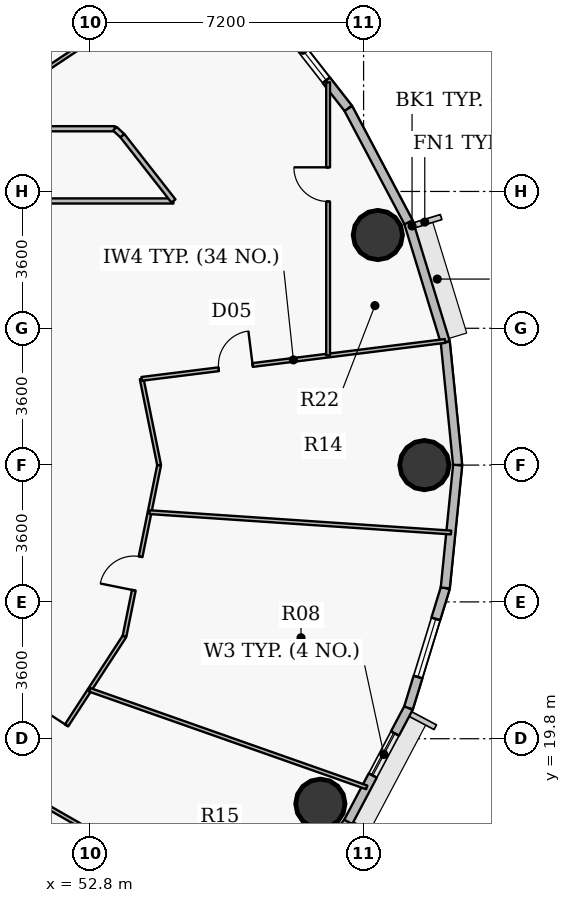
"""IFC4 building model, lengths in metres.
Left out: names, types, materials, properties, quantities, classifications, styles, units other than length and angle.
Written with IfcOpenShell. Run it as: python <this file> out.ifc"""

import sys

from ifc_helpers import new_model, si_unit, direction, frame, frame_2d, origin, origin_2d, place, context, subcontext, project, spatial, rectangle, hollow_circle, extrude, source, transform, mapped, element, fill, save


model = new_model("IFC4")
c1 = context("Model", 3, precision=1e-05, world=origin(), true_north=direction((0.0, 1.0)))
c2 = subcontext(c1, "Body", "Model", "MODEL_VIEW")
j1 = project(units=[si_unit("LENGTHUNIT", "METRE"), si_unit("PLANEANGLEUNIT", "RADIAN")], contexts=[c1])
p1 = place(None, origin())
s1 = spatial("IfcSite", under=j1, at=p1, CompositionType="ELEMENT")
p2 = place(p1, origin())
s2 = spatial("IfcBuilding", under=s1, at=p2, CompositionType="ELEMENT")
p3 = place(p2, frame((0.0, 0.0, 201.15)))
s3 = spatial("IfcBuildingStorey", under=s2, at=p3, CompositionType="ELEMENT", Elevation=201.15)
for number, where, z_axis, x_axis in (
    (1, (61.6, 27.0, 0.0), (0.0, 0.0, 1.0), (1.0, 0.0, 0.0)),
    (2, (60.375, 33.053, 0.0), (0.0, 0.0, 1.0), (1.0, 0.0, 0.0)),
    (3, (58.863, 18.089, 0.0), (0.0, 0.0, 1.0), (1.0, 0.0, 0.0)),
):
    element("IfcColumn", number, at=place(p3, frame(where, z_axis=z_axis, x_axis=x_axis)), inside=s3, PredefinedType="COLUMN", context=c2, shape_type="SweptSolid", body=[
        extrude(hollow_circle(Radius=0.65, WallThickness=0.04, at=origin_2d()), origin(), (0.0, 0.0, 1.0), 3.75),
    ])
p4 = place(p3, frame((62.15, 30.234, 0.0), z_axis=(0.0, 0.0, 1.0), x_axis=(0.100061534614, -0.994981250723, 0.0)))
e4 = element("IfcWall", 4, at=p4, inside=s3, PredefinedType="SOLIDWALL", context=c2, shape_type="SweptSolid", body=[
    extrude(rectangle(XDim=3.25, YDim=0.24, at=frame_2d((1.625, 0.0))), origin(), (0.0, 0.0, 1.0), 3.45),
])
p5 = place(p3, frame((61.183, 33.389, 0.0), z_axis=(0.0, 0.0, 1.0), x_axis=(0.293097995113, -0.956082405058, 0.0)))
e5 = element("IfcWall", 5, at=p5, inside=s3, PredefinedType="SOLIDWALL", context=c2, shape_type="SweptSolid", body=[
    extrude(rectangle(XDim=3.3, YDim=0.24, at=frame_2d((1.65, 0.0))), origin(), (0.0, 0.0, 1.0), 3.45),
])
p6 = place(p3, frame((59.596, 36.388, 0.0), z_axis=(0.0, 0.0, 1.0), x_axis=(0.467586874938, -0.88394712194, 0.0)))
e6 = element("IfcWall", 6, at=p6, inside=s3, PredefinedType="SOLIDWALL", context=c2, shape_type="SweptSolid", body=[
    extrude(rectangle(XDim=3.393, YDim=0.24, at=frame_2d((1.697, 0.0))), origin(), (0.0, 0.0, 1.0), 3.45),
])
p7 = place(p3, frame((57.428, 39.158, 0.0), z_axis=(0.0, 0.0, 1.0), x_axis=(0.616287674549, -0.787521112224, 0.0)))
e7 = element("IfcWall", 7, at=p7, inside=s3, PredefinedType="SOLIDWALL", context=c2, shape_type="SweptSolid", body=[
    extrude(rectangle(XDim=3.517, YDim=0.24, at=frame_2d((1.759, 0.0))), origin(), (0.0, 0.0, 1.0), 3.45),
])
p8 = place(p7, frame((0.579, 0.0, 0.9)))
e8 = element("IfcOpeningElement", 8, at=p8, cuts=e7, PredefinedType="OPENING", context=c2, shape_type="SweptSolid", body=[
    extrude(rectangle(XDim=2.0, YDim=1.75, at=origin_2d()), frame((1.0, 0.13, 0.875), z_axis=(0.0, -1.0, 0.0), x_axis=(1.0, 0.0, 0.0)), (0.0, 0.0, 1.0), 0.26),
])
p9 = place(p3, frame((59.596, 17.612, 0.0), z_axis=(0.0, 0.0, 1.0), x_axis=(-0.616287674549, -0.787521112224, 0.0)))
e9 = element("IfcWall", 9, at=p9, inside=s3, PredefinedType="SOLIDWALL", context=c2, shape_type="SweptSolid", body=[
    extrude(rectangle(XDim=3.517, YDim=0.24, at=frame_2d((1.759, 0.0))), origin(), (0.0, 0.0, 1.0), 3.45),
])
p10 = place(p3, frame((61.183, 20.611, 0.0), z_axis=(0.0, 0.0, 1.0), x_axis=(-0.467586874938, -0.88394712194, 0.0)))
e10 = element("IfcWall", 10, at=p10, inside=s3, PredefinedType="SOLIDWALL", context=c2, shape_type="SweptSolid", body=[
    extrude(rectangle(XDim=3.393, YDim=0.24, at=frame_2d((1.697, 0.0))), origin(), (0.0, 0.0, 1.0), 3.45),
])
p11 = place(p10, frame((0.762, 0.0, 0.9)))
e11 = element("IfcOpeningElement", 11, at=p11, cuts=e10, PredefinedType="OPENING", context=c2, shape_type="SweptSolid", body=[
    extrude(rectangle(XDim=1.25, YDim=1.65, at=origin_2d()), frame((0.625, 0.13, 0.825), z_axis=(0.0, -1.0, 0.0), x_axis=(1.0, 0.0, 0.0)), (0.0, 0.0, 1.0), 0.26),
])
p12 = place(p3, frame((62.15, 23.766, 0.0), z_axis=(0.0, 0.0, 1.0), x_axis=(-0.293097995113, -0.956082405058, 0.0)))
e12 = element("IfcWall", 12, at=p12, inside=s3, PredefinedType="SOLIDWALL", context=c2, shape_type="SweptSolid", body=[
    extrude(rectangle(XDim=3.3, YDim=0.24, at=frame_2d((1.65, 0.0))), origin(), (0.0, 0.0, 1.0), 3.45),
])
p13 = place(p12, frame((0.85, 0.0, 0.9)))
e13 = element("IfcOpeningElement", 13, at=p13, cuts=e12, PredefinedType="OPENING", context=c2, shape_type="SweptSolid", body=[
    extrude(rectangle(XDim=1.6, YDim=1.75, at=origin_2d()), frame((0.8, 0.13, 0.875), z_axis=(0.0, -1.0, 0.0), x_axis=(1.0, 0.0, 0.0)), (0.0, 0.0, 1.0), 0.26),
])
p14 = place(p3, frame((62.475, 27.0, 0.0), z_axis=(0.0, 0.0, 1.0), x_axis=(-0.100061534614, -0.994981250723, 0.0)))
e14 = element("IfcWall", 14, at=p14, inside=s3, PredefinedType="SOLIDWALL", context=c2, shape_type="SweptSolid", body=[
    extrude(rectangle(XDim=3.25, YDim=0.24, at=frame_2d((1.625, 0.0))), origin(), (0.0, 0.0, 1.0), 3.45),
])
p15 = place(p3, frame((38.541, 35.85, 0.0), z_axis=(0.0, 0.0, 1.0), x_axis=(1.0, 0.0, 0.0)))
e15 = element("IfcWall", 15, at=p15, inside=s3, PredefinedType="PARTITIONING", context=c2, shape_type="SweptSolid", body=[
    extrude(rectangle(XDim=14.913, YDim=0.135, at=frame_2d((7.456, 0.0))), origin(), (0.0, 0.0, 1.0), 2.885),
])
p16 = place(p15, frame((9.46, 0.0, 0.0)))
e16 = element("IfcOpeningElement", 16, at=p16, cuts=e15, PredefinedType="OPENING", context=c2, shape_type="SweptSolid", body=[
    extrude(rectangle(XDim=1.0, YDim=2.15, at=origin_2d()), frame((0.5, 0.078, 1.075), z_axis=(0.0, -1.0, 0.0), x_axis=(1.0, 0.0, 0.0)), (0.0, 0.0, 1.0), 0.155),
])
p17 = place(p3, frame((44.571, 18.15, 0.0), z_axis=(0.0, 0.0, 1.0), x_axis=(0.695670435579, -0.718361082647, 0.0)))
e17 = element("IfcWall", 17, at=p17, inside=s3, PredefinedType="PARTITIONING", context=c2, shape_type="SweptSolid", body=[
    extrude(rectangle(XDim=10.63, YDim=0.135, at=frame_2d((5.315, 0.0))), origin(), (0.0, 0.0, 1.0), 2.885),
])
p18 = place(p3, frame((45.8, 33.95, 0.0), z_axis=(0.0, 0.0, 1.0), x_axis=(1.0, 0.0, 0.0)))
e18 = element("IfcWall", 18, at=p18, inside=s3, PredefinedType="PARTITIONING", context=c2, shape_type="SweptSolid", body=[
    extrude(rectangle(XDim=9.197, YDim=0.135, at=frame_2d((4.599, 0.0))), origin(), (0.0, 0.0, 1.0), 3.45),
])
p19 = place(p3, frame((50.06, 36.356, 0.0), z_axis=(0.0, 0.0, 1.0), x_axis=(0.832520763353, 0.553993843455, 0.0)))
e19 = element("IfcWall", 19, at=p19, inside=s3, PredefinedType="PARTITIONING", context=c2, shape_type="SweptSolid", body=[
    extrude(rectangle(XDim=7.26, YDim=0.1, at=frame_2d((3.63, 0.0))), origin(), (0.0, 0.0, 1.0), 2.885),
])
p20 = place(p19, frame((3.18, 0.0, 0.0)))
e20 = element("IfcOpeningElement", 20, at=p20, cuts=e19, PredefinedType="OPENING", context=c2, shape_type="SweptSolid", body=[
    extrude(rectangle(XDim=0.9, YDim=2.1, at=origin_2d()), frame((0.45, 0.06, 1.05), z_axis=(0.0, -1.0, 0.0), x_axis=(1.0, 0.0, 0.0)), (0.0, 0.0, 1.0), 0.12),
])
p21 = place(p3, frame((51.017, 18.393, 0.0), z_axis=(0.0, 0.0, 1.0), x_axis=(0.867591997953, -0.497276708773, 0.0)))
e21 = element("IfcWall", 21, at=p21, inside=s3, PredefinedType="PARTITIONING", context=c2, shape_type="SweptSolid", body=[
    extrude(rectangle(XDim=7.3, YDim=0.1, at=frame_2d((3.65, 0.0))), origin(), (0.0, 0.0, 1.0), 2.885),
])
p22 = place(p3, frame((51.064, 18.429, 0.0), z_axis=(0.0, 0.0, 1.0), x_axis=(0.545382906853, 0.838187022634, 0.0)))
e22 = element("IfcWall", 22, at=p22, inside=s3, PredefinedType="PARTITIONING", context=c2, shape_type="SweptSolid", body=[
    extrude(rectangle(XDim=4.849, YDim=0.1, at=frame_2d((2.425, 0.0))), origin(), (0.0, 0.0, 1.0), 2.885),
])
p23 = place(p22, frame((1.155, 0.0, 0.0)))
e23 = element("IfcOpeningElement", 23, at=p23, cuts=e22, PredefinedType="OPENING", context=c2, shape_type="SweptSolid", body=[
    extrude(rectangle(XDim=0.9, YDim=2.1, at=origin_2d()), frame((0.45, 0.06, 1.05), z_axis=(0.0, -1.0, 0.0), x_axis=(1.0, 0.0, 0.0)), (0.0, 0.0, 1.0), 0.12),
])
p24 = place(p3, frame((52.793, 21.087, 0.0), z_axis=(0.0, 0.0, 1.0), x_axis=(0.94322572083, -0.33215243423, 0.0)))
e24 = element("IfcWall", 24, at=p24, inside=s3, PredefinedType="PARTITIONING", context=c2, shape_type="SweptSolid", body=[
    extrude(rectangle(XDim=7.728, YDim=0.1, at=frame_2d((3.864, 0.0))), origin(), (0.0, 0.0, 1.0), 2.885),
])
p25 = place(p3, frame((53.454, 35.85, 0.0), z_axis=(0.0, 0.0, 1.0), x_axis=(0.736667385572, -0.676255249913, 0.0)))
e25 = element("IfcWall", 25, at=p25, inside=s3, PredefinedType="PARTITIONING", context=c2, shape_type="SweptSolid", body=[
    extrude(rectangle(XDim=0.271, YDim=0.135, at=frame_2d((0.135, 0.0))), origin(), (0.0, 0.0, 1.0), 3.45),
])
p26 = place(p3, frame((53.653, 35.667, 0.0), z_axis=(0.0, 0.0, 1.0), x_axis=(0.616302223209, -0.787509726713, 0.0)))
e26 = element("IfcWall", 26, at=p26, inside=s3, PredefinedType="PARTITIONING", context=c2, shape_type="SweptSolid", body=[
    extrude(rectangle(XDim=2.18, YDim=0.135, at=frame_2d((1.09, 0.0))), origin(), (0.0, 0.0, 1.0), 3.45),
])
p27 = place(p3, frame((53.709, 22.494, 0.0), z_axis=(0.0, 0.0, 1.0), x_axis=(0.19825018224, 0.980151450155, 0.0)))
e27 = element("IfcWall", 27, at=p27, inside=s3, PredefinedType="PARTITIONING", context=c2, shape_type="SweptSolid", body=[
    extrude(rectangle(XDim=4.597, YDim=0.1, at=frame_2d((2.299, 0.0))), origin(), (0.0, 0.0, 1.0), 2.885),
])
p28 = place(p27, frame((1.237, 0.0, 0.0)))
e28 = element("IfcOpeningElement", 28, at=p28, cuts=e27, PredefinedType="OPENING", context=c2, shape_type="SweptSolid", body=[
    extrude(rectangle(XDim=0.9, YDim=2.1, at=origin_2d()), frame((0.45, 0.06, 1.05), z_axis=(0.0, -1.0, 0.0), x_axis=(1.0, 0.0, 0.0)), (0.0, 0.0, 1.0), 0.12),
])
p29 = place(p3, frame((54.161, 29.269, 0.0), z_axis=(0.0, 0.0, 1.0), x_axis=(0.198265432228, -0.980148365495, 0.0)))
e29 = element("IfcWall", 29, at=p29, inside=s3, PredefinedType="PARTITIONING", context=c2, shape_type="SweptSolid", body=[
    extrude(rectangle(XDim=2.315, YDim=0.1, at=frame_2d((1.157, 0.0))), origin(), (0.0, 0.0, 1.0), 2.885),
])
p30 = place(p3, frame((54.161, 29.269, 0.0), z_axis=(0.0, 0.0, 1.0), x_axis=(0.99228860955, 0.123948841697, 0.0)))
e30 = element("IfcWall", 30, at=p30, inside=s3, PredefinedType="PARTITIONING", context=c2, shape_type="SweptSolid", body=[
    extrude(rectangle(XDim=8.046, YDim=0.1, at=frame_2d((4.023, 0.0))), origin(), (0.0, 0.0, 1.0), 2.885),
])
p31 = place(p30, frame((2.042, 0.0, 0.0)))
e31 = element("IfcOpeningElement", 31, at=p31, cuts=e30, PredefinedType="OPENING", context=c2, shape_type="SweptSolid", body=[
    extrude(rectangle(XDim=0.9, YDim=2.1, at=origin_2d()), frame((0.45, 0.06, 1.05), z_axis=(0.0, -1.0, 0.0), x_axis=(1.0, 0.0, 0.0)), (0.0, 0.0, 1.0), 0.12),
])
p32 = place(p3, frame((54.369, 25.761, 0.0), z_axis=(0.0, 0.0, 1.0), x_axis=(0.99773610993, -0.06725068729, 0.0)))
e32 = element("IfcWall", 32, at=p32, inside=s3, PredefinedType="PARTITIONING", context=c2, shape_type="SweptSolid", body=[
    extrude(rectangle(XDim=7.95, YDim=0.1, at=frame_2d((3.975, 0.0))), origin(), (0.0, 0.0, 1.0), 2.885),
])
p33 = place(p3, frame((59.067, 29.882, 0.0), z_axis=(0.0, 0.0, 1.0), x_axis=(0.0, 1.0, 0.0)))
e33 = element("IfcWall", 33, at=p33, inside=s3, PredefinedType="PARTITIONING", context=c2, shape_type="SweptSolid", body=[
    extrude(rectangle(XDim=7.191, YDim=0.1, at=frame_2d((3.596, 0.0))), origin(), (0.0, 0.0, 1.0), 2.885),
])
p34 = place(p33, frame((4.053, 0.0, 0.0)))
e34 = element("IfcOpeningElement", 34, at=p34, cuts=e33, PredefinedType="OPENING", context=c2, shape_type="SweptSolid", body=[
    extrude(rectangle(XDim=0.9, YDim=2.1, at=origin_2d()), frame((0.45, 0.06, 1.05), z_axis=(0.0, -1.0, 0.0), x_axis=(1.0, 0.0, 0.0)), (0.0, 0.0, 1.0), 0.12),
])
m1 = source(origin(), c2, "Body", "SweptSolid", [
    extrude(rectangle(XDim=2.0, YDim=1.75, at=origin_2d()), frame((1.0, 0.03, 0.875), z_axis=(0.0, -1.0, 0.0), x_axis=(1.0, 0.0, 0.0)), (0.0, 0.0, 1.0), 0.06),
])
p35 = place(p8, origin())
e35 = element("IfcWindow", 35, at=p35, inside=s3, PartitioningType="DOUBLE_PANEL_VERTICAL", PredefinedType="WINDOW", context=c2, shape_type="MappedRepresentation", body=[
    mapped(m1, transform((0.0, 0.0, 0.0), x_axis=(1.0, 0.0, 0.0), y_axis=(0.0, 1.0, 0.0), z_axis=(0.0, 0.0, 1.0), scale=1.0)),
])
fill(e8, e35)
m2 = source(origin(), c2, "Body", "SweptSolid", [
    extrude(rectangle(XDim=1.25, YDim=1.65, at=origin_2d()), frame((0.625, 0.03, 0.825), z_axis=(0.0, -1.0, 0.0), x_axis=(1.0, 0.0, 0.0)), (0.0, 0.0, 1.0), 0.06),
])
p36 = place(p11, origin())
e36 = element("IfcWindow", 36, at=p36, inside=s3, PartitioningType="SINGLE_PANEL", PredefinedType="WINDOW", context=c2, shape_type="MappedRepresentation", body=[
    mapped(m2, transform((0.0, 0.0, 0.0), x_axis=(1.0, 0.0, 0.0), y_axis=(0.0, 1.0, 0.0), z_axis=(0.0, 0.0, 1.0), scale=1.0)),
])
fill(e11, e36)
m3 = source(origin(), c2, "Body", "SweptSolid", [
    extrude(rectangle(XDim=1.6, YDim=1.75, at=origin_2d()), frame((0.8, 0.03, 0.875), z_axis=(0.0, -1.0, 0.0), x_axis=(1.0, 0.0, 0.0)), (0.0, 0.0, 1.0), 0.06),
])
p37 = place(p13, origin())
e37 = element("IfcWindow", 37, at=p37, inside=s3, PartitioningType="DOUBLE_PANEL_VERTICAL", PredefinedType="WINDOW", context=c2, shape_type="MappedRepresentation", body=[
    mapped(m3, transform((0.0, 0.0, 0.0), x_axis=(1.0, 0.0, 0.0), y_axis=(0.0, 1.0, 0.0), z_axis=(0.0, 0.0, 1.0), scale=1.0)),
])
fill(e13, e37)
m4 = source(origin(), c2, "Body", "SweptSolid", [
    extrude(rectangle(XDim=0.9, YDim=2.1, at=origin_2d()), frame((0.45, 0.025, 1.05), z_axis=(0.0, -1.0, 0.0), x_axis=(1.0, 0.0, 0.0)), (0.0, 0.0, 1.0), 0.05),
])
p38 = place(p23, origin())
e38 = element("IfcDoor", 38, at=p38, inside=s3, OperationType="SINGLE_SWING_RIGHT", PredefinedType="DOOR", context=c2, shape_type="MappedRepresentation", body=[
    mapped(m4, transform((0.0, 0.0, 0.0), x_axis=(1.0, 0.0, 0.0), y_axis=(0.0, 1.0, 0.0), z_axis=(0.0, 0.0, 1.0), scale=1.0)),
])
fill(e23, e38)
p39 = place(p28, origin())
e39 = element("IfcDoor", 39, at=p39, inside=s3, OperationType="SINGLE_SWING_LEFT", PredefinedType="DOOR", context=c2, shape_type="MappedRepresentation", body=[
    mapped(m4, transform((0.0, 0.0, 0.0), x_axis=(1.0, 0.0, 0.0), y_axis=(0.0, 1.0, 0.0), z_axis=(0.0, 0.0, 1.0), scale=1.0)),
])
fill(e28, e39)
p40 = place(p31, origin())
e40 = element("IfcDoor", 40, at=p40, inside=s3, OperationType="SINGLE_SWING_RIGHT", PredefinedType="DOOR", context=c2, shape_type="MappedRepresentation", body=[
    mapped(m4, transform((0.0, 0.0, 0.0), x_axis=(1.0, 0.0, 0.0), y_axis=(0.0, 1.0, 0.0), z_axis=(0.0, 0.0, 1.0), scale=1.0)),
])
fill(e31, e40)
p41 = place(p34, origin())
e41 = element("IfcDoor", 41, at=p41, inside=s3, OperationType="SINGLE_SWING_RIGHT", PredefinedType="DOOR", context=c2, shape_type="MappedRepresentation", body=[
    mapped(m4, transform((0.0, 0.0, 0.0), x_axis=(1.0, 0.0, 0.0), y_axis=(0.0, 1.0, 0.0), z_axis=(0.0, 0.0, 1.0), scale=1.0)),
])
fill(e34, e41)
save(model, sys.argv[1])
